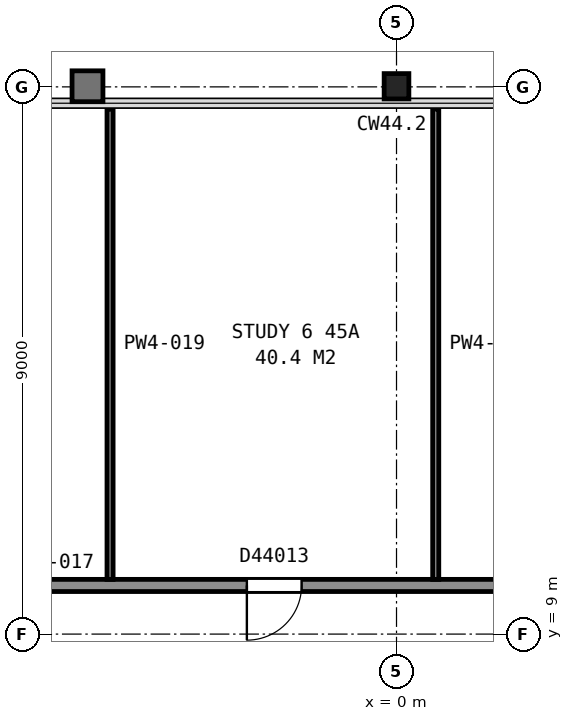
"""IFC4 building model, lengths in metres.
Left out: names, types, materials, properties, quantities, classifications, styles, units other than length and angle.
Written with IfcOpenShell. Run it as: python <this file> out.ifc"""

import sys

from ifc_helpers import new_model, si_unit, direction, frame, frame_2d, origin, origin_2d, place, context, subcontext, project, spatial, rectangle, i_section, extrude, element, fill, save


model = new_model("IFC4")
c1 = context("Model", 3, precision=1e-05, world=origin(), true_north=direction((0.0, 1.0)))
c2 = subcontext(c1, "Body", "Model", "MODEL_VIEW")
j1 = project(units=[si_unit("LENGTHUNIT", "METRE"), si_unit("PLANEANGLEUNIT", "RADIAN")], contexts=[c1])
p1 = place(None, origin())
s1 = spatial("IfcSite", under=j1, at=p1, CompositionType="ELEMENT")
p2 = place(p1, origin())
s2 = spatial("IfcBuilding", under=s1, at=p2, CompositionType="ELEMENT")
p3 = place(p2, frame((0.0, 0.0, 182.1)))
s3 = spatial("IfcBuildingStorey", under=s2, at=p3, CompositionType="ELEMENT", Elevation=182.1)
p4 = place(p3, frame((0.0, 18.01, 0.0), z_axis=(0.0, 0.0, 1.0), x_axis=(1.0, 0.0, 0.0)))
e1 = element("IfcColumn", 1, at=p4, inside=s3, PredefinedType="COLUMN", context=c2, shape_type="SweptSolid", body=[
    extrude(i_section(OverallWidth=0.406, OverallDepth=0.417, WebThickness=0.03, FlangeThickness=0.048, FilletRadius=0.015, at=origin_2d()), origin(), (0.0, 0.0, 1.0), 3.67),
])
p5 = place(p3, frame((-8.828, 9.8, 0.0), z_axis=(0.0, 0.0, 1.0), x_axis=(1.0, 0.0, 0.0)))
e2 = element("IfcWall", 2, at=p5, inside=s3, PredefinedType="PARTITIONING", context=c2, shape_type="SweptSolid", body=[
    extrude(rectangle(XDim=17.656, YDim=0.2, at=frame_2d((8.828, 0.0))), origin(), (0.0, 0.0, 1.0), 2.713),
])
p6 = place(p5, frame((11.723, 0.0, 0.0)))
e3 = element("IfcOpeningElement", 3, at=p6, cuts=e2, PredefinedType="OPENING", context=c2, shape_type="SweptSolid", body=[
    extrude(rectangle(XDim=0.9, YDim=2.1, at=frame_2d((0.45, 1.05))), frame((0.0, 0.11, 0.0), z_axis=(0.0, -1.0, 0.0), x_axis=(1.0, 0.0, 0.0)), (0.0, 0.0, 1.0), 0.22),
])
p7 = place(p5, frame((6.367, 0.0, 0.0)))
e4 = element("IfcOpeningElement", 4, at=p7, cuts=e2, PredefinedType="OPENING", context=c2, shape_type="SweptSolid", body=[
    extrude(rectangle(XDim=0.9, YDim=2.1, at=frame_2d((0.45, 1.05))), frame((0.0, 0.11, 0.0), z_axis=(0.0, -1.0, 0.0), x_axis=(1.0, 0.0, 0.0)), (0.0, 0.0, 1.0), 0.22),
])
for number, where, z_axis, x_axis in (
    (5, (-4.711, 9.9, 0.0), (0.0, 0.0, 1.0), (0.0, 1.0, 0.0)),
    (6, (0.645, 9.9, 0.0), (0.0, 0.0, 1.0), (0.0, 1.0, 0.0)),
):
    element("IfcWall", number, at=place(p3, frame(where, z_axis=z_axis, x_axis=x_axis)), inside=s3, PredefinedType="PARTITIONING", context=c2, shape_type="SweptSolid", body=[
        extrude(rectangle(XDim=7.735, YDim=0.1, at=frame_2d((3.868, 0.0))), origin(), (0.0, 0.0, 1.0), 2.713),
    ])
p8 = place(p7, origin())
e7 = element("IfcDoor", 7, at=p8, inside=s3, OperationType="SINGLE_SWING_LEFT", PredefinedType="DOOR", context=c2, shape_type="SweptSolid", body=[
    extrude(rectangle(XDim=0.9, YDim=2.1, at=frame_2d((0.45, 1.05))), frame((0.0, 0.025, 0.0), z_axis=(0.0, -1.0, 0.0), x_axis=(1.0, 0.0, 0.0)), (0.0, 0.0, 1.0), 0.05),
])
fill(e4, e7)
save(model, sys.argv[1])
